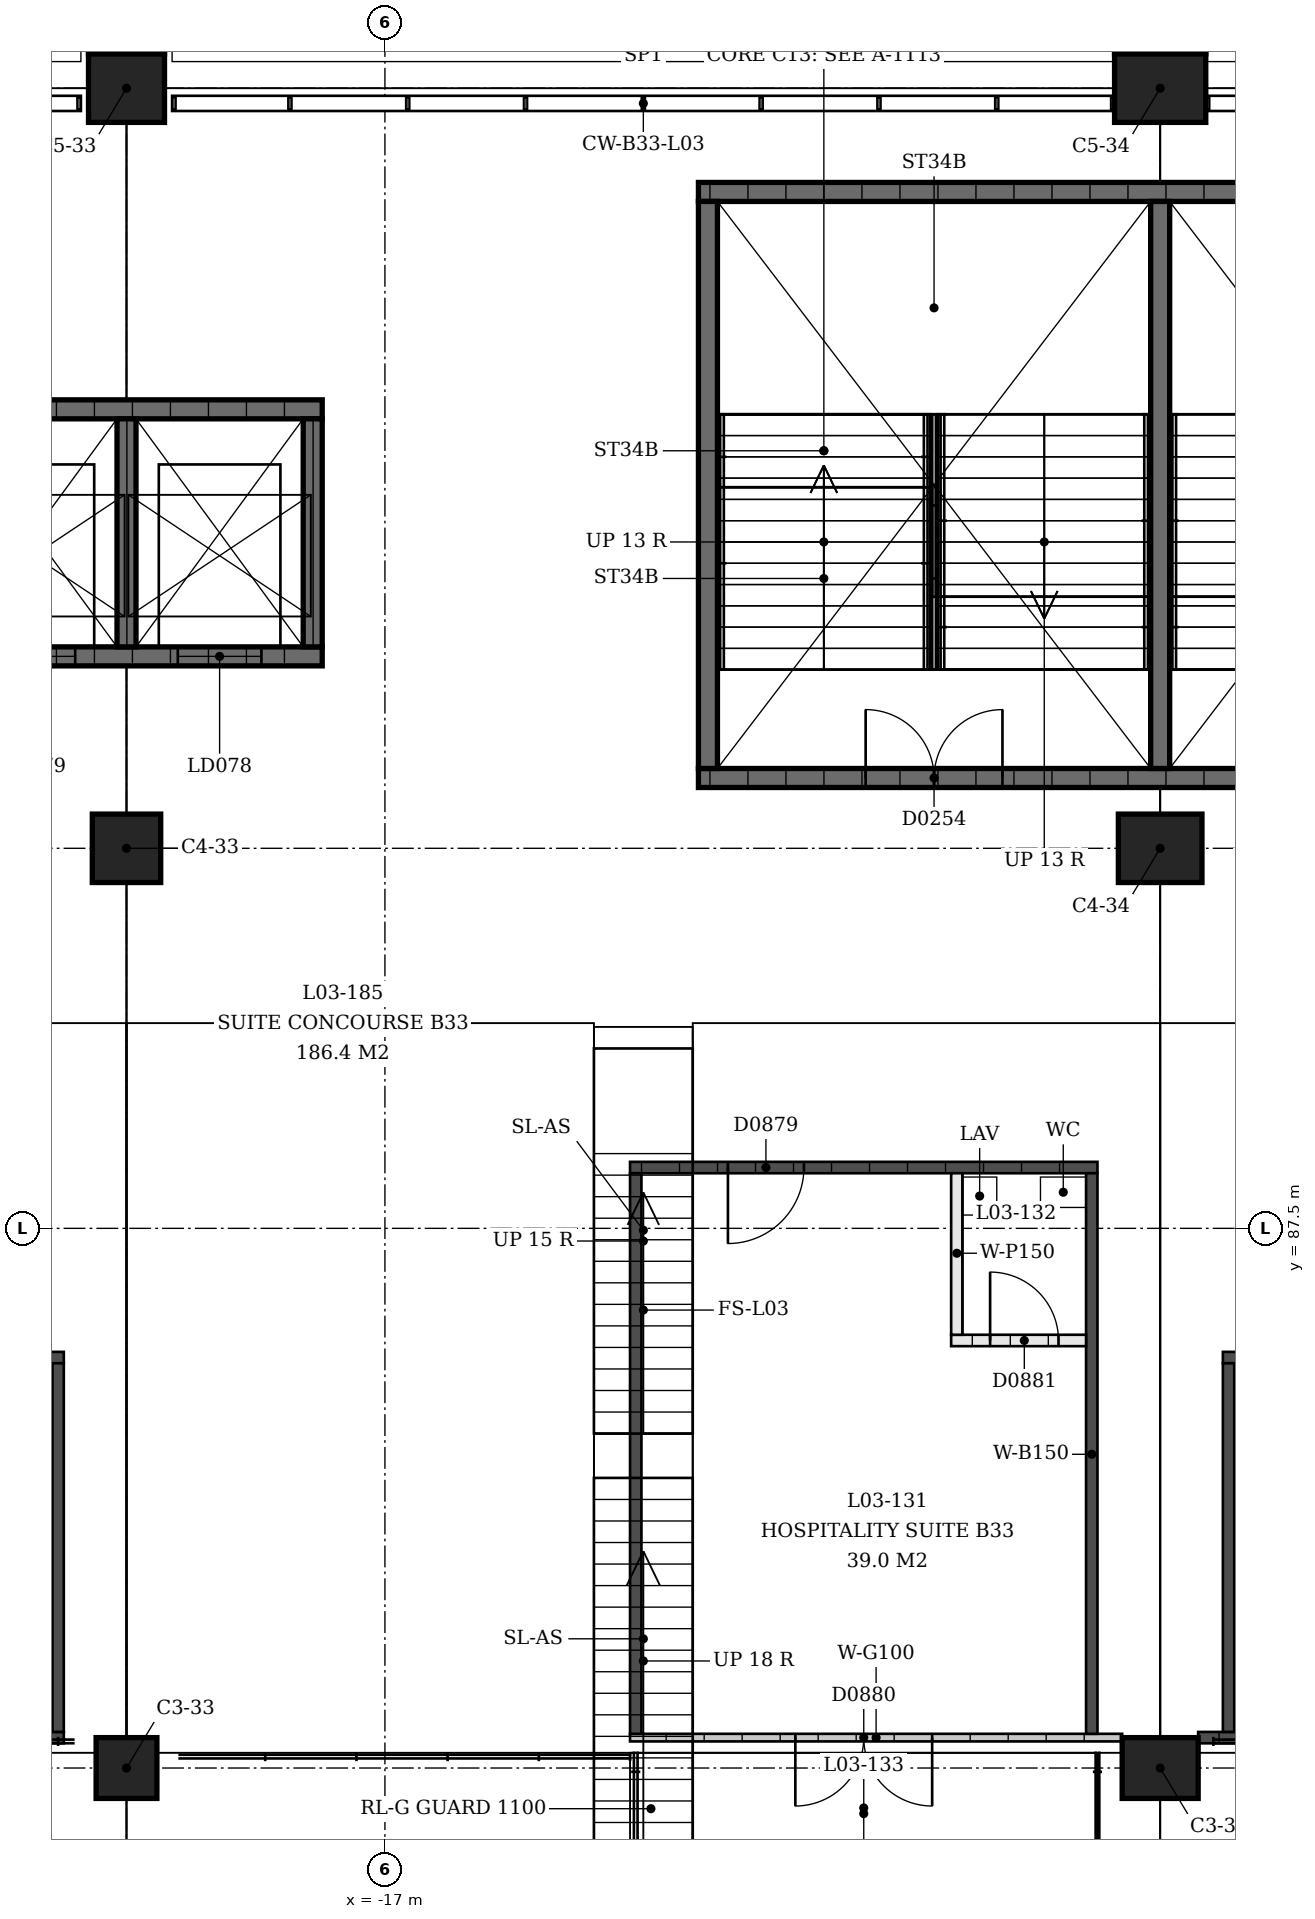
"""IFC4 building model, lengths in metres.
Left out: names, types, materials, properties, quantities, classifications, styles, units other than length and angle.
Written with IfcOpenShell. Run it as: python <this file> out.ifc"""

import sys

from ifc_helpers import new_model, si_unit, direction, frame, frame_2d, origin, origin_2d, place, context, subcontext, project, spatial, rectangle, extrude, element, fill, save


model = new_model("IFC4")
c1 = context("Model", 3, precision=1e-05, world=origin(), true_north=direction((0.0, 1.0)))
c2 = subcontext(c1, "Body", "Model", "MODEL_VIEW")
j1 = project(units=[si_unit("LENGTHUNIT", "METRE"), si_unit("PLANEANGLEUNIT", "RADIAN")], contexts=[c1])
p1 = place(None, origin())
s1 = spatial("IfcSite", under=j1, at=p1, CompositionType="ELEMENT")
p2 = place(p1, origin())
s2 = spatial("IfcBuilding", under=s1, at=p2, CompositionType="ELEMENT")
p3 = place(p2, frame((0.0, 0.0, 13.5)))
s3 = spatial("IfcBuildingStorey", under=s2, at=p3, CompositionType="ELEMENT", Elevation=13.5)
p4 = place(p3, frame((-20.4, 80.4, 0.0), z_axis=(0.0, 0.0, 1.0), x_axis=(-1.0, 0.0, 0.0)))
e1 = element("IfcColumn", 1, at=p4, inside=s3, PredefinedType="COLUMN", context=c2, shape_type="SweptSolid", body=[
    extrude(rectangle(XDim=0.8, YDim=0.8, at=origin_2d()), origin(), (0.0, 0.0, 1.0), 2.033),
])
p5 = place(p3, frame((-20.4, 92.5, 0.0), z_axis=(0.0, 0.0, 1.0), x_axis=(-1.0, 0.0, 0.0)))
e2 = element("IfcColumn", 2, at=p5, inside=s3, PredefinedType="COLUMN", context=c2, shape_type="SweptSolid", body=[
    extrude(rectangle(XDim=0.9, YDim=0.9, at=origin_2d()), origin(), (0.0, 0.0, 1.0), 4.5),
])
p6 = place(p3, frame((-20.4, 102.5, 0.0), z_axis=(0.0, 0.0, 1.0), x_axis=(-1.0, 0.0, 0.0)))
e3 = element("IfcColumn", 3, at=p6, inside=s3, PredefinedType="COLUMN", context=c2, shape_type="SweptSolid", body=[
    extrude(rectangle(XDim=1.0, YDim=0.9, at=origin_2d()), origin(), (0.0, 0.0, 1.0), 4.5),
])
p7 = place(p3, frame((-6.8, 80.4, 0.0), z_axis=(0.0, 0.0, 1.0), x_axis=(-1.0, 0.0, 0.0)))
e4 = element("IfcColumn", 4, at=p7, inside=s3, PredefinedType="COLUMN", context=c2, shape_type="SweptSolid", body=[
    extrude(rectangle(XDim=1.0, YDim=0.8, at=origin_2d()), origin(), (0.0, 0.0, 1.0), 2.033),
])
p8 = place(p3, frame((-6.8, 92.5, 0.0), z_axis=(0.0, 0.0, 1.0), x_axis=(-1.0, 0.0, 0.0)))
e5 = element("IfcColumn", 5, at=p8, inside=s3, PredefinedType="COLUMN", context=c2, shape_type="SweptSolid", body=[
    extrude(rectangle(XDim=1.1, YDim=0.9, at=origin_2d()), origin(), (0.0, 0.0, 1.0), 4.5),
])
p9 = place(p3, frame((-6.8, 102.5, 0.0), z_axis=(0.0, 0.0, 1.0), x_axis=(-1.0, 0.0, 0.0)))
e6 = element("IfcColumn", 6, at=p9, inside=s3, PredefinedType="COLUMN", context=c2, shape_type="SweptSolid", body=[
    extrude(rectangle(XDim=1.2, YDim=0.9, at=origin_2d()), origin(), (0.0, 0.0, 1.0), 4.5),
])
p10 = place(p3, frame((-0.725, 93.425, 0.0), z_axis=(0.0, 0.0, 1.0), x_axis=(-1.0, 0.0, 0.0)))
e7 = element("IfcWall", 7, at=p10, inside=s3, PredefinedType="SHEAR", context=c2, shape_type="SweptSolid", body=[
    extrude(rectangle(XDim=12.15, YDim=0.25, at=frame_2d((6.075, 0.0))), origin(), (0.0, 0.0, 1.0), 4.09),
])
p11 = place(p10, frame((2.2, 0.0, 0.0)))
e8 = element("IfcOpeningElement", 8, at=p11, cuts=e7, PredefinedType="OPENING", context=c2, shape_type="SweptSolid", body=[
    extrude(rectangle(XDim=1.8, YDim=2.1, at=frame_2d((0.9, 1.05))), frame((0.0, 0.125, 0.0), z_axis=(0.0, -1.0, 0.0), x_axis=(1.0, 0.0, 0.0)), (0.0, 0.0, 1.0), 0.25),
])
p12 = place(p10, frame((8.15, 0.0, 0.0)))
e9 = element("IfcOpeningElement", 9, at=p12, cuts=e7, PredefinedType="OPENING", context=c2, shape_type="SweptSolid", body=[
    extrude(rectangle(XDim=1.8, YDim=2.1, at=frame_2d((0.9, 1.05))), frame((0.0, 0.125, 0.0), z_axis=(0.0, -1.0, 0.0), x_axis=(1.0, 0.0, 0.0)), (0.0, 0.0, 1.0), 0.25),
])
p13 = place(p3, frame((-0.725, 101.135, 0.0), z_axis=(0.0, 0.0, 1.0), x_axis=(-1.0, 0.0, 0.0)))
e10 = element("IfcWall", 10, at=p13, inside=s3, PredefinedType="SHEAR", context=c2, shape_type="SweptSolid", body=[
    extrude(rectangle(XDim=12.15, YDim=0.25, at=frame_2d((6.075, 0.0))), origin(), (0.0, 0.0, 1.0), 4.09),
])
for number, where, z_axis, x_axis in (
    (11, (-12.75, 93.55, 0.0), (0.0, 0.0, 1.0), (0.0, 1.0, 0.0)),
    (12, (-6.8, 93.55, 0.0), (0.0, 0.0, 1.0), (0.0, 1.0, 0.0)),
):
    element("IfcWall", number, at=place(p3, frame(where, z_axis=z_axis, x_axis=x_axis)), inside=s3, PredefinedType="SHEAR", context=c2, shape_type="SweptSolid", body=[
        extrude(rectangle(XDim=7.46, YDim=0.25, at=frame_2d((3.73, 0.0))), origin(), (0.0, 0.0, 1.0), 4.09),
    ])
p14 = place(p3, frame((-17.825, 95.025, 0.0), z_axis=(0.0, 0.0, 1.0), x_axis=(-1.0, 0.0, 0.0)))
e13 = element("IfcWall", 13, at=p14, inside=s3, PredefinedType="SHEAR", context=c2, shape_type="SweptSolid", body=[
    extrude(rectangle(XDim=5.15, YDim=0.25, at=frame_2d((2.575, 0.0))), origin(), (0.0, 0.0, 1.0), 4.09),
])
p15 = place(p14, frame((0.8, 0.0, 0.0)))
e14 = element("IfcOpeningElement", 14, at=p15, cuts=e13, PredefinedType="OPENING", context=c2, shape_type="SweptSolid", body=[
    extrude(rectangle(XDim=1.1, YDim=2.1, at=frame_2d((0.55, 1.05))), frame((0.0, 0.125, 0.0), z_axis=(0.0, -1.0, 0.0), x_axis=(1.0, 0.0, 0.0)), (0.0, 0.0, 1.0), 0.25),
])
p16 = place(p14, frame((3.25, 0.0, 0.0)))
e15 = element("IfcOpeningElement", 15, at=p16, cuts=e13, PredefinedType="OPENING", context=c2, shape_type="SweptSolid", body=[
    extrude(rectangle(XDim=1.1, YDim=2.1, at=frame_2d((0.55, 1.05))), frame((0.0, 0.125, 0.0), z_axis=(0.0, -1.0, 0.0), x_axis=(1.0, 0.0, 0.0)), (0.0, 0.0, 1.0), 0.25),
])
p17 = place(p3, frame((-17.825, 98.275, 0.0), z_axis=(0.0, 0.0, 1.0), x_axis=(-1.0, 0.0, 0.0)))
e16 = element("IfcWall", 16, at=p17, inside=s3, PredefinedType="SHEAR", context=c2, shape_type="SweptSolid", body=[
    extrude(rectangle(XDim=5.15, YDim=0.25, at=frame_2d((2.575, 0.0))), origin(), (0.0, 0.0, 1.0), 4.09),
])
for number, where, z_axis, x_axis in (
    (17, (-17.95, 95.15, 0.0), (0.0, 0.0, 1.0), (0.0, 1.0, 0.0)),
    (18, (-20.4, 95.15, 0.0), (0.0, 0.0, 1.0), (0.0, 1.0, 0.0)),
):
    element("IfcWall", number, at=place(p3, frame(where, z_axis=z_axis, x_axis=x_axis)), inside=s3, PredefinedType="SHEAR", context=c2, shape_type="SweptSolid", body=[
        extrude(rectangle(XDim=3.0, YDim=0.25, at=frame_2d((1.5, 0.0))), origin(), (0.0, 0.0, 1.0), 4.09),
    ])
p18 = place(p3, frame((-33.5, 80.8, 0.0), z_axis=(0.0, 0.0, 1.0), x_axis=(1.0, 0.0, 0.0)))
e19 = element("IfcWall", 19, at=p18, inside=s3, PredefinedType="SOLIDWALL", context=c2, shape_type="SweptSolid", body=[
    extrude(rectangle(XDim=12.275, YDim=0.15, at=frame_2d((6.137, 0.0))), origin(), (0.0, 0.0, 1.0), 3.0),
])
p19 = place(p3, frame((-33.175, 85.8, 0.0), z_axis=(0.0, 0.0, 1.0), x_axis=(1.0, 0.0, 0.0)))
e20 = element("IfcWall", 20, at=p19, inside=s3, PredefinedType="SOLIDWALL", context=c2, shape_type="SweptSolid", body=[
    extrude(rectangle(XDim=11.95, YDim=0.15, at=frame_2d((5.975, 0.0))), origin(), (0.0, 0.0, 1.0), 3.0),
])
p20 = place(p19, frame((2.525, 0.0, 0.0)))
e21 = element("IfcOpeningElement", 21, at=p20, cuts=e20, PredefinedType="OPENING", context=c2, shape_type="SweptSolid", body=[
    extrude(rectangle(XDim=1.0, YDim=2.1, at=frame_2d((0.5, 1.05))), frame((0.0, 0.075, 0.0), z_axis=(0.0, -1.0, 0.0), x_axis=(1.0, 0.0, 0.0)), (0.0, 0.0, 1.0), 0.15),
])
p21 = place(p19, frame((8.425, 0.0, 0.0)))
e22 = element("IfcOpeningElement", 22, at=p21, cuts=e20, PredefinedType="OPENING", context=c2, shape_type="SweptSolid", body=[
    extrude(rectangle(XDim=1.0, YDim=2.1, at=frame_2d((0.5, 1.05))), frame((0.0, 0.075, 0.0), z_axis=(0.0, -1.0, 0.0), x_axis=(1.0, 0.0, 0.0)), (0.0, 0.0, 1.0), 0.15),
])
p22 = place(p3, frame((-21.3, 80.875, 0.0), z_axis=(0.0, 0.0, 1.0), x_axis=(0.0, 1.0, 0.0)))
e23 = element("IfcWall", 23, at=p22, inside=s3, PredefinedType="SOLIDWALL", context=c2, shape_type="SweptSolid", body=[
    extrude(rectangle(XDim=4.85, YDim=0.15, at=frame_2d((2.425, 0.0))), origin(), (0.0, 0.0, 1.0), 3.0),
])
p23 = place(p3, frame((-7.3, 80.8, 0.0), z_axis=(0.0, 0.0, 1.0), x_axis=(-1.0, 0.0, 0.0)))
e24 = element("IfcWall", 24, at=p23, inside=s3, PredefinedType="PARTITIONING", context=c2, shape_type="SweptSolid", body=[
    extrude(rectangle(XDim=6.475, YDim=0.1, at=frame_2d((3.237, 0.0))), origin(), (0.0, 0.0, 1.0), 3.0),
])
p24 = place(p23, frame((2.5, 0.0, 0.0)))
e25 = element("IfcOpeningElement", 25, at=p24, cuts=e24, PredefinedType="OPENING", context=c2, shape_type="SweptSolid", body=[
    extrude(rectangle(XDim=1.8, YDim=2.1, at=frame_2d((0.9, 1.05))), frame((0.0, 0.05, 0.0), z_axis=(0.0, -1.0, 0.0), x_axis=(1.0, 0.0, 0.0)), (0.0, 0.0, 1.0), 0.1),
])
p25 = place(p3, frame((-7.625, 88.3, 0.0), z_axis=(0.0, 0.0, 1.0), x_axis=(-1.0, 0.0, 0.0)))
e26 = element("IfcWall", 26, at=p25, inside=s3, PredefinedType="SOLIDWALL", context=c2, shape_type="SweptSolid", body=[
    extrude(rectangle(XDim=6.15, YDim=0.15, at=frame_2d((3.075, 0.0))), origin(), (0.0, 0.0, 1.0), 3.0),
])
p26 = place(p25, frame((3.862, 0.0, 0.0)))
e27 = element("IfcOpeningElement", 27, at=p26, cuts=e26, PredefinedType="OPENING", context=c2, shape_type="SweptSolid", body=[
    extrude(rectangle(XDim=1.0, YDim=2.1, at=frame_2d((0.5, 1.05))), frame((0.0, 0.075, 0.0), z_axis=(0.0, -1.0, 0.0), x_axis=(1.0, 0.0, 0.0)), (0.0, 0.0, 1.0), 0.15),
])
for number, where, z_axis, x_axis in (
    (28, (-7.7, 80.85, 0.0), (0.0, 0.0, 1.0), (0.0, 1.0, 0.0)),
    (29, (-13.7, 80.85, 0.0), (0.0, 0.0, 1.0), (0.0, 1.0, 0.0)),
):
    element("IfcWall", number, at=place(p3, frame(where, z_axis=z_axis, x_axis=x_axis)), inside=s3, PredefinedType="SOLIDWALL", context=c2, shape_type="SweptSolid", body=[
        extrude(rectangle(XDim=7.375, YDim=0.15, at=frame_2d((3.688, 0.0))), origin(), (0.0, 0.0, 1.0), 3.0),
    ])
p27 = place(p3, frame((-7.775, 86.025, 0.0), z_axis=(0.0, 0.0, 1.0), x_axis=(-1.0, 0.0, 0.0)))
e30 = element("IfcWall", 30, at=p27, inside=s3, PredefinedType="PARTITIONING", context=c2, shape_type="SweptSolid", body=[
    extrude(rectangle(XDim=1.775, YDim=0.15, at=frame_2d((0.888, 0.0))), origin(), (0.0, 0.0, 1.0), 3.0),
])
p28 = place(p27, frame((0.363, 0.0, 0.0)))
e31 = element("IfcOpeningElement", 31, at=p28, cuts=e30, PredefinedType="OPENING", context=c2, shape_type="SweptSolid", body=[
    extrude(rectangle(XDim=0.9, YDim=2.1, at=frame_2d((0.45, 1.05))), frame((0.0, 0.075, 0.0), z_axis=(0.0, -1.0, 0.0), x_axis=(1.0, 0.0, 0.0)), (0.0, 0.0, 1.0), 0.15),
])
p29 = place(p3, frame((-9.475, 86.1, 0.0), z_axis=(0.0, 0.0, 1.0), x_axis=(0.0, 1.0, 0.0)))
e32 = element("IfcWall", 32, at=p29, inside=s3, PredefinedType="PARTITIONING", context=c2, shape_type="SweptSolid", body=[
    extrude(rectangle(XDim=2.125, YDim=0.15, at=frame_2d((1.062, 0.0))), origin(), (0.0, 0.0, 1.0), 3.0),
])
p30 = place(p3, frame((-6.3, 80.8, 0.0), z_axis=(0.0, 0.0, 1.0), x_axis=(1.0, 0.0, 0.0)))
e33 = element("IfcWall", 33, at=p30, inside=s3, PredefinedType="SOLIDWALL", context=c2, shape_type="SweptSolid", body=[
    extrude(rectangle(XDim=12.275, YDim=0.15, at=frame_2d((6.138, 0.0))), origin(), (0.0, 0.0, 1.0), 3.0),
])
p31 = place(p3, frame((-5.975, 85.8, 0.0), z_axis=(0.0, 0.0, 1.0), x_axis=(1.0, 0.0, 0.0)))
e34 = element("IfcWall", 34, at=p31, inside=s3, PredefinedType="SOLIDWALL", context=c2, shape_type="SweptSolid", body=[
    extrude(rectangle(XDim=11.95, YDim=0.15, at=frame_2d((5.975, 0.0))), origin(), (0.0, 0.0, 1.0), 3.0),
])
p32 = place(p31, frame((2.525, 0.0, 0.0)))
e35 = element("IfcOpeningElement", 35, at=p32, cuts=e34, PredefinedType="OPENING", context=c2, shape_type="SweptSolid", body=[
    extrude(rectangle(XDim=1.0, YDim=2.1, at=frame_2d((0.5, 1.05))), frame((0.0, 0.075, 0.0), z_axis=(0.0, -1.0, 0.0), x_axis=(1.0, 0.0, 0.0)), (0.0, 0.0, 1.0), 0.15),
])
p33 = place(p31, frame((8.425, 0.0, 0.0)))
e36 = element("IfcOpeningElement", 36, at=p33, cuts=e34, PredefinedType="OPENING", context=c2, shape_type="SweptSolid", body=[
    extrude(rectangle(XDim=1.0, YDim=2.1, at=frame_2d((0.5, 1.05))), frame((0.0, 0.075, 0.0), z_axis=(0.0, -1.0, 0.0), x_axis=(1.0, 0.0, 0.0)), (0.0, 0.0, 1.0), 0.15),
])
p34 = place(p3, frame((-5.9, 80.875, 0.0), z_axis=(0.0, 0.0, 1.0), x_axis=(0.0, 1.0, 0.0)))
e37 = element("IfcWall", 37, at=p34, inside=s3, PredefinedType="SOLIDWALL", context=c2, shape_type="SweptSolid", body=[
    extrude(rectangle(XDim=4.85, YDim=0.15, at=frame_2d((2.425, 0.0))), origin(), (0.0, 0.0, 1.0), 3.0),
])
p35 = place(p12, origin())
e38 = element("IfcDoor", 38, at=p35, inside=s3, OperationType="DOUBLE_DOOR_SINGLE_SWING", PredefinedType="DOOR", context=c2, shape_type="SweptSolid", body=[
    extrude(rectangle(XDim=1.8, YDim=2.1, at=frame_2d((0.9, 1.05))), frame((0.0, 0.025, 0.0), z_axis=(0.0, -1.0, 0.0), x_axis=(1.0, 0.0, 0.0)), (0.0, 0.0, 1.0), 0.05),
])
fill(e9, e38)
p36 = place(p15, origin())
e39 = element("IfcDoor", 39, at=p36, inside=s3, OperationType="SLIDING_TO_LEFT", PredefinedType="DOOR", context=c2, shape_type="SweptSolid", body=[
    extrude(rectangle(XDim=1.1, YDim=2.1, at=frame_2d((0.55, 1.05))), frame((0.0, 0.025, 0.0), z_axis=(0.0, -1.0, 0.0), x_axis=(1.0, 0.0, 0.0)), (0.0, 0.0, 1.0), 0.05),
])
fill(e14, e39)
p37 = place(p16, origin())
e40 = element("IfcDoor", 40, at=p37, inside=s3, OperationType="SLIDING_TO_LEFT", PredefinedType="DOOR", context=c2, shape_type="SweptSolid", body=[
    extrude(rectangle(XDim=1.1, YDim=2.1, at=frame_2d((0.55, 1.05))), frame((0.0, 0.025, 0.0), z_axis=(0.0, -1.0, 0.0), x_axis=(1.0, 0.0, 0.0)), (0.0, 0.0, 1.0), 0.05),
])
fill(e15, e40)
p38 = place(p26, origin())
e41 = element("IfcDoor", 41, at=p38, inside=s3, OperationType="SINGLE_SWING_LEFT", PredefinedType="DOOR", context=c2, shape_type="SweptSolid", body=[
    extrude(rectangle(XDim=1.0, YDim=2.1, at=frame_2d((0.5, 1.05))), frame((0.0, 0.025, 0.0), z_axis=(0.0, -1.0, 0.0), x_axis=(1.0, 0.0, 0.0)), (0.0, 0.0, 1.0), 0.05),
])
fill(e27, e41)
p39 = place(p24, origin())
e42 = element("IfcDoor", 42, at=p39, inside=s3, OperationType="DOUBLE_DOOR_SINGLE_SWING", PredefinedType="DOOR", context=c2, shape_type="SweptSolid", body=[
    extrude(rectangle(XDim=1.8, YDim=2.1, at=frame_2d((0.9, 1.05))), frame((0.0, 0.025, 0.0), z_axis=(0.0, -1.0, 0.0), x_axis=(1.0, 0.0, 0.0)), (0.0, 0.0, 1.0), 0.05),
])
fill(e25, e42)
p40 = place(p28, origin())
e43 = element("IfcDoor", 43, at=p40, inside=s3, OperationType="SINGLE_SWING_RIGHT", PredefinedType="DOOR", context=c2, shape_type="SweptSolid", body=[
    extrude(rectangle(XDim=0.9, YDim=2.1, at=frame_2d((0.45, 1.05))), frame((0.0, 0.025, 0.0), z_axis=(0.0, -1.0, 0.0), x_axis=(1.0, 0.0, 0.0)), (0.0, 0.0, 1.0), 0.05),
])
fill(e31, e43)
save(model, sys.argv[1])
